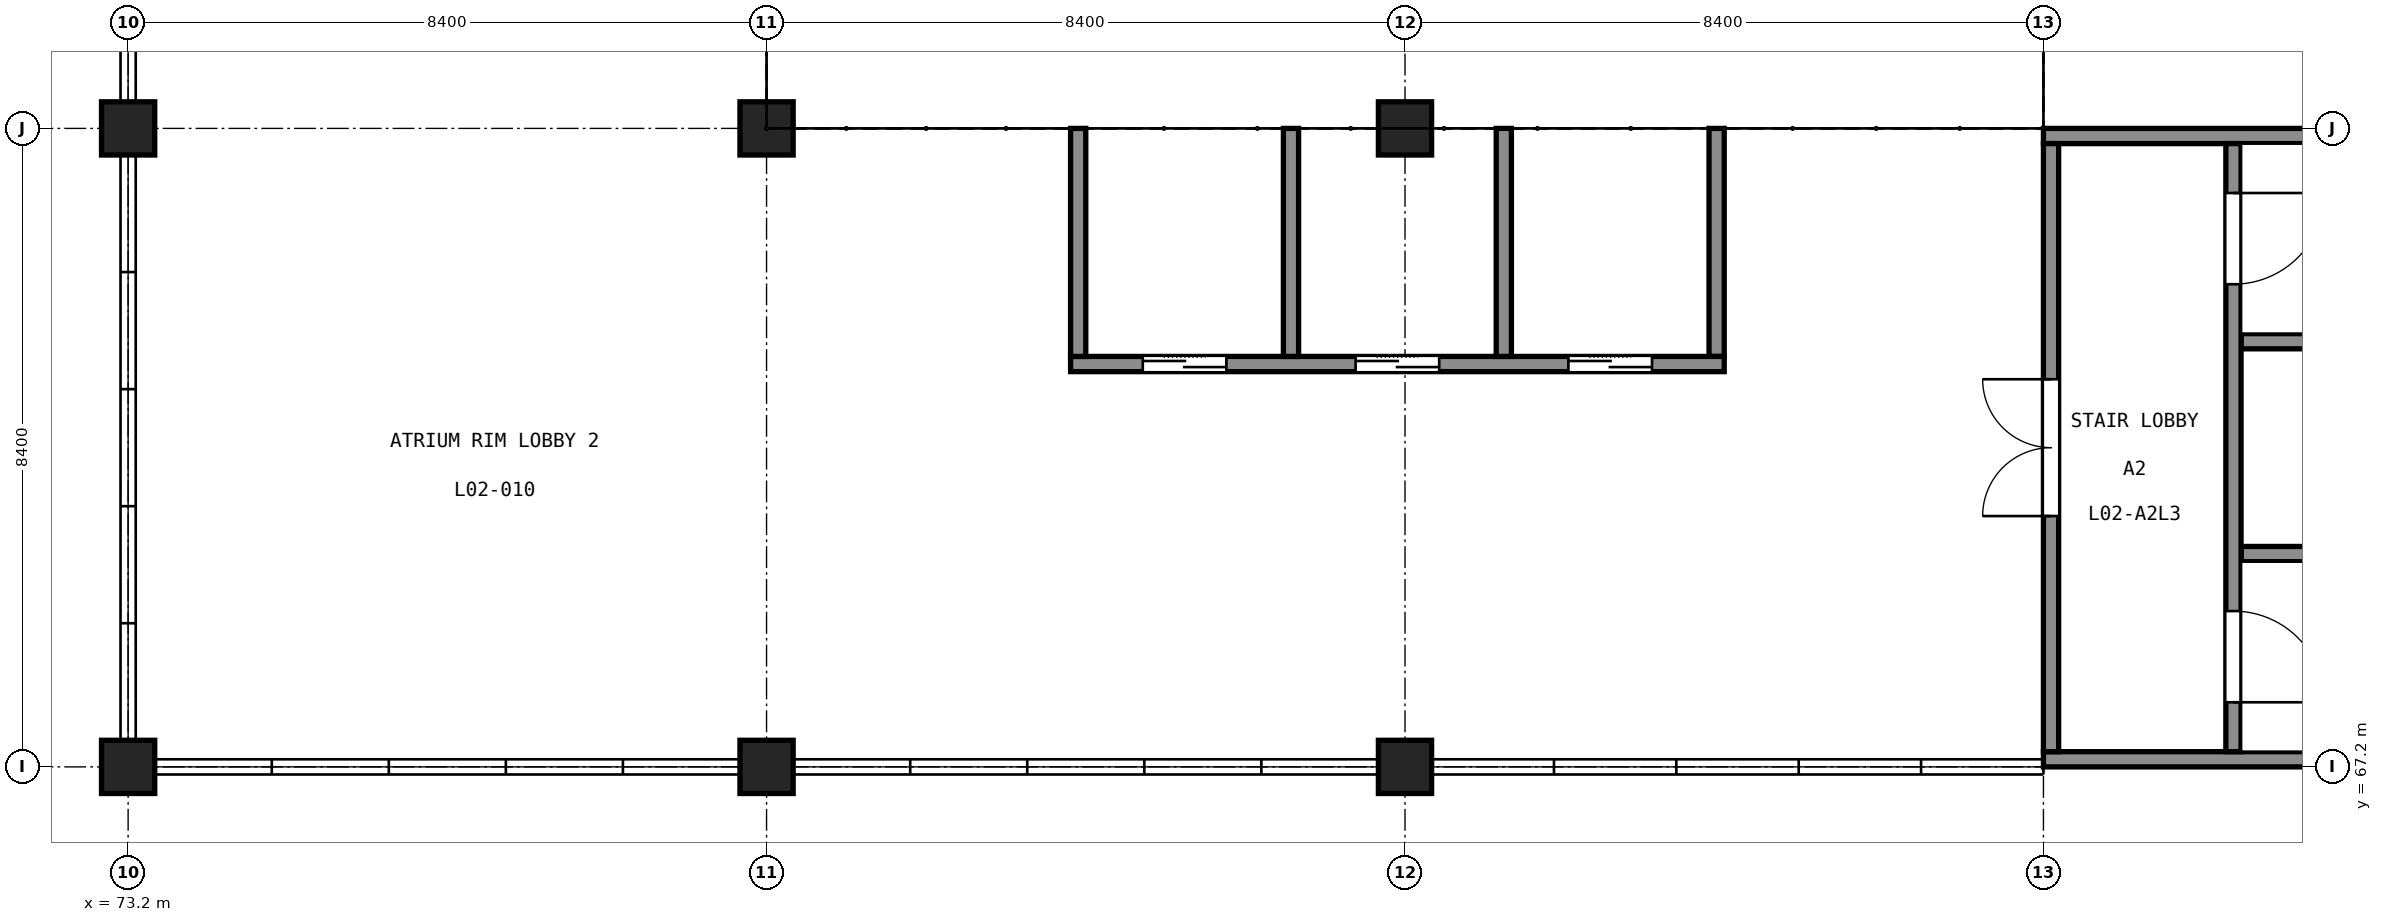
"""IFC4 building model, lengths in metres.
Left out: names, types, materials, properties, quantities, classifications, styles, units other than length and angle.
Written with IfcOpenShell. Run it as: python <this file> out.ifc"""

import sys

from ifc_helpers import new_model, si_unit, direction, frame, frame_2d, origin, origin_2d, place, context, subcontext, project, spatial, rectangle, extrude, element, fill, save


model = new_model("IFC4")
c1 = context("Model", 3, precision=1e-05, world=origin(), true_north=direction((0.0, 1.0)))
c2 = subcontext(c1, "Body", "Model", "MODEL_VIEW")
j1 = project(units=[si_unit("LENGTHUNIT", "METRE"), si_unit("PLANEANGLEUNIT", "RADIAN")], contexts=[c1])
p1 = place(None, origin())
s1 = spatial("IfcSite", under=j1, at=p1, CompositionType="ELEMENT")
p2 = place(p1, origin())
s2 = spatial("IfcBuilding", under=s1, at=p2, CompositionType="ELEMENT")
p3 = place(p2, frame((0.0, 0.0, 10.5)))
s3 = spatial("IfcBuildingStorey", under=s2, at=p3, CompositionType="ELEMENT", Elevation=10.5)
for number, where, z_axis, x_axis in (
    (1, (98.4, 67.3, 0.0), (0.0, 0.0, 1.0), (1.0, 0.0, 0.0)),
    (2, (98.4, 75.5, 0.0), (0.0, 0.0, 1.0), (1.0, 0.0, 0.0)),
):
    element("IfcWall", number, at=place(p3, frame(where, z_axis=z_axis, x_axis=x_axis)), inside=s3, PredefinedType="SHEAR", context=c2, shape_type="SweptSolid", body=[
        extrude(rectangle(XDim=8.4, YDim=0.2, at=frame_2d((4.2, 0.0))), origin(), (0.0, 0.0, 1.0), 9.5),
    ])
p4 = place(p3, frame((98.5, 67.4, 0.0), z_axis=(0.0, 0.0, 1.0), x_axis=(0.0, 1.0, 0.0)))
e3 = element("IfcWall", 3, at=p4, inside=s3, PredefinedType="SHEAR", context=c2, shape_type="SweptSolid", body=[
    extrude(rectangle(XDim=8.0, YDim=0.2, at=frame_2d((4.0, 0.0))), origin(), (0.0, 0.0, 1.0), 9.5),
])
p5 = place(p4, frame((3.1, 0.0, 0.0)))
e4 = element("IfcOpeningElement", 4, at=p5, cuts=e3, PredefinedType="OPENING", context=c2, shape_type="SweptSolid", body=[
    extrude(rectangle(XDim=1.8, YDim=2.1, at=frame_2d((0.9, 1.05))), frame((0.0, 0.11, 0.0), z_axis=(0.0, -1.0, 0.0), x_axis=(1.0, 0.0, 0.0)), (0.0, 0.0, 1.0), 0.22),
])
p6 = place(p3, frame((100.9, 67.4, 0.0), z_axis=(0.0, 0.0, 1.0), x_axis=(0.0, 1.0, 0.0)))
e5 = element("IfcWall", 5, at=p6, inside=s3, PredefinedType="SHEAR", context=c2, shape_type="SweptSolid", body=[
    extrude(rectangle(XDim=8.0, YDim=0.2, at=frame_2d((4.0, 0.0))), origin(), (0.0, 0.0, 1.0), 9.5),
])
p7 = place(p6, frame((0.65, 0.0, 0.0)))
e6 = element("IfcOpeningElement", 6, at=p7, cuts=e5, PredefinedType="OPENING", context=c2, shape_type="SweptSolid", body=[
    extrude(rectangle(XDim=1.2, YDim=2.1, at=frame_2d((0.6, 1.05))), frame((0.0, 0.11, 0.0), z_axis=(0.0, -1.0, 0.0), x_axis=(1.0, 0.0, 0.0)), (0.0, 0.0, 1.0), 0.22),
])
p8 = place(p6, frame((6.15, 0.0, 0.0)))
e7 = element("IfcOpeningElement", 7, at=p8, cuts=e5, PredefinedType="OPENING", context=c2, shape_type="SweptSolid", body=[
    extrude(rectangle(XDim=1.2, YDim=2.1, at=frame_2d((0.6, 1.05))), frame((0.0, 0.11, 0.0), z_axis=(0.0, -1.0, 0.0), x_axis=(1.0, 0.0, 0.0)), (0.0, 0.0, 1.0), 0.22),
])
for number, where, z_axis, x_axis in (
    (8, (101.0, 70.0, 0.0), (0.0, 0.0, 1.0), (1.0, 0.0, 0.0)),
    (9, (101.0, 72.8, 0.0), (0.0, 0.0, 1.0), (1.0, 0.0, 0.0)),
):
    element("IfcWall", number, at=place(p3, frame(where, z_axis=z_axis, x_axis=x_axis)), inside=s3, PredefinedType="SHEAR", context=c2, shape_type="SweptSolid", body=[
        extrude(rectangle(XDim=5.6, YDim=0.2, at=frame_2d((2.8, 0.0))), origin(), (0.0, 0.0, 1.0), 9.5),
    ])
p9 = place(p3, frame((85.6, 72.5, 0.0), z_axis=(0.0, 0.0, 1.0), x_axis=(1.0, 0.0, 0.0)))
e10 = element("IfcWall", 10, at=p9, inside=s3, PredefinedType="SHEAR", context=c2, shape_type="SweptSolid", body=[
    extrude(rectangle(XDim=8.6, YDim=0.2, at=frame_2d((4.3, 0.0))), origin(), (0.0, 0.0, 1.0), 9.5),
])
p10 = place(p9, frame((0.95, 0.0, 0.0)))
e11 = element("IfcOpeningElement", 11, at=p10, cuts=e10, PredefinedType="OPENING", context=c2, shape_type="SweptSolid", body=[
    extrude(rectangle(XDim=1.1, YDim=2.1, at=frame_2d((0.55, 1.05))), frame((0.0, 0.11, 0.0), z_axis=(0.0, -1.0, 0.0), x_axis=(1.0, 0.0, 0.0)), (0.0, 0.0, 1.0), 0.22),
])
p11 = place(p9, frame((3.75, 0.0, 0.0)))
e12 = element("IfcOpeningElement", 12, at=p11, cuts=e10, PredefinedType="OPENING", context=c2, shape_type="SweptSolid", body=[
    extrude(rectangle(XDim=1.1, YDim=2.1, at=frame_2d((0.55, 1.05))), frame((0.0, 0.11, 0.0), z_axis=(0.0, -1.0, 0.0), x_axis=(1.0, 0.0, 0.0)), (0.0, 0.0, 1.0), 0.22),
])
p12 = place(p9, frame((6.55, 0.0, 0.0)))
e13 = element("IfcOpeningElement", 13, at=p12, cuts=e10, PredefinedType="OPENING", context=c2, shape_type="SweptSolid", body=[
    extrude(rectangle(XDim=1.1, YDim=2.1, at=frame_2d((0.55, 1.05))), frame((0.0, 0.11, 0.0), z_axis=(0.0, -1.0, 0.0), x_axis=(1.0, 0.0, 0.0)), (0.0, 0.0, 1.0), 0.22),
])
for number, where, z_axis, x_axis in (
    (14, (85.7, 72.6, 0.0), (0.0, 0.0, 1.0), (0.0, 1.0, 0.0)),
    (15, (94.1, 72.6, 0.0), (0.0, 0.0, 1.0), (0.0, 1.0, 0.0)),
    (16, (88.5, 72.6, 0.0), (0.0, 0.0, 1.0), (0.0, 1.0, 0.0)),
    (17, (91.3, 72.6, 0.0), (0.0, 0.0, 1.0), (0.0, 1.0, 0.0)),
):
    element("IfcWall", number, at=place(p3, frame(where, z_axis=z_axis, x_axis=x_axis)), inside=s3, PredefinedType="SHEAR", context=c2, shape_type="SweptSolid", body=[
        extrude(rectangle(XDim=3.0, YDim=0.2, at=frame_2d((1.5, 0.0))), origin(), (0.0, 0.0, 1.0), 9.5),
    ])
for number, where, z_axis, x_axis in (
    (18, (73.2, 67.2, 0.0), (0.0, 0.0, 1.0), (1.0, 0.0, 0.0)),
    (19, (73.2, 75.6, 0.0), (0.0, 0.0, 1.0), (1.0, 0.0, 0.0)),
    (20, (81.6, 67.2, 0.0), (0.0, 0.0, 1.0), (1.0, 0.0, 0.0)),
    (21, (81.6, 75.6, 0.0), (0.0, 0.0, 1.0), (1.0, 0.0, 0.0)),
    (22, (90.0, 67.2, 0.0), (0.0, 0.0, 1.0), (1.0, 0.0, 0.0)),
    (23, (90.0, 75.6, 0.0), (0.0, 0.0, 1.0), (1.0, 0.0, 0.0)),
):
    element("IfcColumn", number, at=place(p3, frame(where, z_axis=z_axis, x_axis=x_axis)), inside=s3, PredefinedType="COLUMN", context=c2, shape_type="SweptSolid", body=[
        extrude(rectangle(XDim=0.7, YDim=0.7, at=origin_2d()), origin(), (0.0, 0.0, 1.0), 9.5),
    ])
p13 = place(p5, origin())
e24 = element("IfcDoor", 24, at=p13, inside=s3, OperationType="DOUBLE_DOOR_SINGLE_SWING", PredefinedType="DOOR", context=c2, shape_type="SweptSolid", body=[
    extrude(rectangle(XDim=1.8, YDim=2.1, at=frame_2d((0.9, 1.05))), frame((0.0, 0.025, 0.0), z_axis=(0.0, -1.0, 0.0), x_axis=(1.0, 0.0, 0.0)), (0.0, 0.0, 1.0), 0.05),
])
fill(e4, e24)
p14 = place(p7, origin())
e25 = element("IfcDoor", 25, at=p14, inside=s3, OperationType="SINGLE_SWING_LEFT", PredefinedType="DOOR", context=c2, shape_type="SweptSolid", body=[
    extrude(rectangle(XDim=1.2, YDim=2.1, at=frame_2d((0.6, 1.05))), frame((0.0, 0.025, 0.0), z_axis=(0.0, -1.0, 0.0), x_axis=(1.0, 0.0, 0.0)), (0.0, 0.0, 1.0), 0.05),
])
fill(e6, e25)
p15 = place(p8, origin())
e26 = element("IfcDoor", 26, at=p15, inside=s3, OperationType="SINGLE_SWING_RIGHT", PredefinedType="DOOR", context=c2, shape_type="SweptSolid", body=[
    extrude(rectangle(XDim=1.2, YDim=2.1, at=frame_2d((0.6, 1.05))), frame((0.0, 0.025, 0.0), z_axis=(0.0, -1.0, 0.0), x_axis=(1.0, 0.0, 0.0)), (0.0, 0.0, 1.0), 0.05),
])
fill(e7, e26)
p16 = place(p10, origin())
e27 = element("IfcDoor", 27, at=p16, inside=s3, OperationType="DOUBLE_DOOR_SLIDING", PredefinedType="DOOR", context=c2, shape_type="SweptSolid", body=[
    extrude(rectangle(XDim=1.1, YDim=2.1, at=frame_2d((0.55, 1.05))), frame((0.0, 0.025, 0.0), z_axis=(0.0, -1.0, 0.0), x_axis=(1.0, 0.0, 0.0)), (0.0, 0.0, 1.0), 0.05),
])
fill(e11, e27)
p17 = place(p11, origin())
e28 = element("IfcDoor", 28, at=p17, inside=s3, OperationType="DOUBLE_DOOR_SLIDING", PredefinedType="DOOR", context=c2, shape_type="SweptSolid", body=[
    extrude(rectangle(XDim=1.1, YDim=2.1, at=frame_2d((0.55, 1.05))), frame((0.0, 0.025, 0.0), z_axis=(0.0, -1.0, 0.0), x_axis=(1.0, 0.0, 0.0)), (0.0, 0.0, 1.0), 0.05),
])
fill(e12, e28)
p18 = place(p12, origin())
e29 = element("IfcDoor", 29, at=p18, inside=s3, OperationType="DOUBLE_DOOR_SLIDING", PredefinedType="DOOR", context=c2, shape_type="SweptSolid", body=[
    extrude(rectangle(XDim=1.1, YDim=2.1, at=frame_2d((0.55, 1.05))), frame((0.0, 0.025, 0.0), z_axis=(0.0, -1.0, 0.0), x_axis=(1.0, 0.0, 0.0)), (0.0, 0.0, 1.0), 0.05),
])
fill(e13, e29)
save(model, sys.argv[1])
